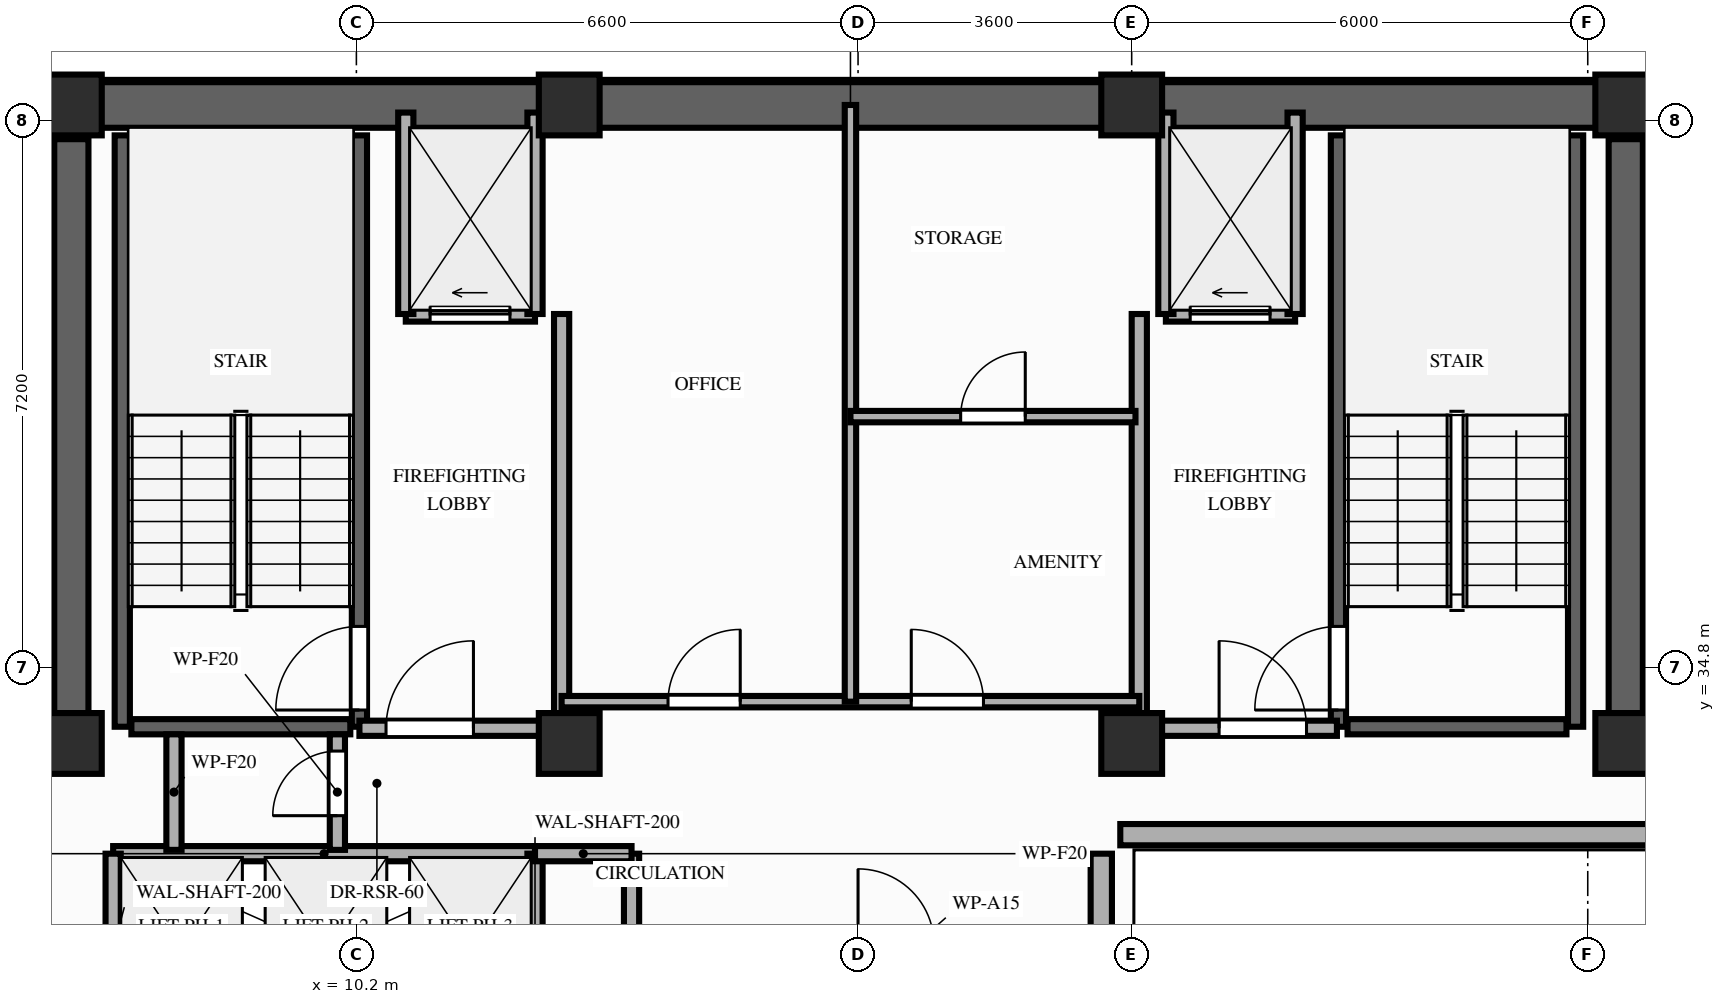
"""IFC4 building model, lengths in metres.
Left out: names, types, materials, properties, quantities, classifications, styles, units other than length and angle.
Written with IfcOpenShell. Run it as: python <this file> out.ifc"""

import sys

from ifc_helpers import new_model, si_unit, direction, frame, frame_2d, origin, origin_2d, place, context, subcontext, project, spatial, rectangle, extrude, element, fill, save


model = new_model("IFC4")
c1 = context("Model", 3, precision=1e-05, world=origin(), true_north=direction((0.0, 1.0)))
c2 = subcontext(c1, "Body", "Model", "MODEL_VIEW")
j1 = project(units=[si_unit("LENGTHUNIT", "METRE"), si_unit("PLANEANGLEUNIT", "RADIAN")], contexts=[c1])
p1 = place(None, origin())
s1 = spatial("IfcSite", under=j1, at=p1, CompositionType="ELEMENT")
p2 = place(p1, origin())
s2 = spatial("IfcBuilding", under=s1, at=p2, CompositionType="ELEMENT")
p3 = place(p2, frame((0.0, 0.0, 247.2)))
s3 = spatial("IfcBuildingStorey", under=s2, at=p3, CompositionType="ELEMENT", Elevation=247.2)
for number, where, z_axis, x_axis in (
    (1, (6.45, 33.8, 0.0), (0.0, 0.0, 1.0), (1.0, 0.0, 0.0)),
    (2, (13.0, 33.8, 0.0), (0.0, 0.0, 1.0), (1.0, 0.0, 0.0)),
    (3, (20.4, 33.8, 0.0), (0.0, 0.0, 1.0), (1.0, 0.0, 0.0)),
    (4, (26.9, 33.8, 0.0), (0.0, 0.0, 1.0), (1.0, 0.0, 0.0)),
    (5, (6.45, 42.2, 0.0), (0.0, 0.0, 1.0), (1.0, 0.0, 0.0)),
    (6, (13.0, 42.2, 0.0), (0.0, 0.0, 1.0), (1.0, 0.0, 0.0)),
    (7, (20.4, 42.2, 0.0), (0.0, 0.0, 1.0), (1.0, 0.0, 0.0)),
    (8, (26.9, 42.2, 0.0), (0.0, 0.0, 1.0), (1.0, 0.0, 0.0)),
):
    element("IfcColumn", number, at=place(p3, frame(where, z_axis=z_axis, x_axis=x_axis)), inside=s3, PredefinedType="COLUMN", context=c2, shape_type="SweptSolid", body=[
        extrude(rectangle(XDim=0.8, YDim=0.8, at=origin_2d()), origin(), (0.0, 0.0, 1.0), 3.2),
    ])
p4 = place(p3, frame((20.0, 10.8, 0.0), z_axis=(0.0, 0.0, 1.0), x_axis=(0.0, 1.0, 0.0)))
e9 = element("IfcWall", 9, at=p4, inside=s3, PredefinedType="STANDARD", context=c2, shape_type="SweptSolid", body=[
    extrude(rectangle(XDim=21.55, YDim=0.28, at=frame_2d((10.775, 0.0))), origin(), (0.0, 0.0, 1.0), 2.5),
])
p5 = place(p4, frame((9.02, 0.0, 0.85)))
e10 = element("IfcOpeningElement", 10, at=p5, cuts=e9, PredefinedType="OPENING", context=c2, shape_type="SweptSolid", body=[
    extrude(rectangle(XDim=2.6, YDim=1.4, at=frame_2d((1.3, 0.7))), frame((0.0, 0.15, 0.0), z_axis=(0.0, -1.0, 0.0), x_axis=(1.0, 0.0, 0.0)), (0.0, 0.0, 1.0), 0.3),
])
p6 = place(p3, frame((20.25, 32.6, 0.0), z_axis=(0.0, 0.0, 1.0), x_axis=(1.0, 0.0, 0.0)))
e11 = element("IfcWall", 11, at=p6, inside=s3, PredefinedType="STANDARD", context=c2, shape_type="SweptSolid", body=[
    extrude(rectangle(XDim=7.35, YDim=0.28, at=frame_2d((3.675, 0.0))), origin(), (0.0, 0.0, 1.0), 2.5),
])
p7 = place(p3, frame((6.45, 42.2, 0.0), z_axis=(0.0, 0.0, 1.0), x_axis=(1.0, 0.0, 0.0)))
e12 = element("IfcWall", 12, at=p7, inside=s3, PredefinedType="SHEAR", context=c2, shape_type="SweptSolid", body=[
    extrude(rectangle(XDim=20.45, YDim=0.6, at=frame_2d((10.225, 0.0))), origin(), (0.0, 0.0, 1.0), 2.96),
])
for number, where, z_axis, x_axis in (
    (13, (6.45, 33.8, 0.0), (0.0, 0.0, 1.0), (0.0, 1.0, 0.0)),
    (14, (26.9, 33.8, 0.0), (0.0, 0.0, 1.0), (0.0, 1.0, 0.0)),
):
    element("IfcWall", number, at=place(p3, frame(where, z_axis=z_axis, x_axis=x_axis)), inside=s3, PredefinedType="SHEAR", context=c2, shape_type="SweptSolid", body=[
        extrude(rectangle(XDim=7.95, YDim=0.45, at=frame_2d((3.975, 0.0))), origin(), (0.0, 0.0, 1.0), 2.96),
    ])
p8 = place(p3, frame((7.12, 34.02, 0.0), z_axis=(0.0, 0.0, 1.0), x_axis=(0.0, 1.0, 0.0)))
e15 = element("IfcWall", 15, at=p8, inside=s3, PredefinedType="SHEAR", context=c2, shape_type="SweptSolid", body=[
    extrude(rectangle(XDim=7.78, YDim=0.2, at=frame_2d((3.89, 0.0))), origin(), (0.0, 0.0, 1.0), 2.96),
])
p9 = place(p3, frame((10.24, 34.02, 0.0), z_axis=(0.0, 0.0, 1.0), x_axis=(0.0, 1.0, 0.0)))
e16 = element("IfcWall", 16, at=p9, inside=s3, PredefinedType="SHEAR", context=c2, shape_type="SweptSolid", body=[
    extrude(rectangle(XDim=7.78, YDim=0.2, at=frame_2d((3.89, 0.0))), origin(), (0.0, 0.0, 1.0), 2.96),
])
p10 = place(p9, frame((0.22, 0.0, 0.0)))
e17 = element("IfcOpeningElement", 17, at=p10, cuts=e16, PredefinedType="OPENING", context=c2, shape_type="SweptSolid", body=[
    extrude(rectangle(XDim=1.1, YDim=2.15, at=frame_2d((0.55, 1.075))), frame((0.0, 0.11, 0.0), z_axis=(0.0, -1.0, 0.0), x_axis=(1.0, 0.0, 0.0)), (0.0, 0.0, 1.0), 0.22),
])
p11 = place(p3, frame((7.24, 34.02, 0.0), z_axis=(0.0, 0.0, 1.0), x_axis=(1.0, 0.0, 0.0)))
e18 = element("IfcWall", 18, at=p11, inside=s3, PredefinedType="SHEAR", context=c2, shape_type="SweptSolid", body=[
    extrude(rectangle(XDim=2.88, YDim=0.2, at=frame_2d((1.44, 0.0))), origin(), (0.0, 0.0, 1.0), 2.96),
])
p12 = place(p3, frame((23.12, 34.02, 0.0), z_axis=(0.0, 0.0, 1.0), x_axis=(0.0, 1.0, 0.0)))
e19 = element("IfcWall", 19, at=p12, inside=s3, PredefinedType="SHEAR", context=c2, shape_type="SweptSolid", body=[
    extrude(rectangle(XDim=7.78, YDim=0.2, at=frame_2d((3.89, 0.0))), origin(), (0.0, 0.0, 1.0), 2.96),
])
p13 = place(p12, frame((0.22, 0.0, 0.0)))
e20 = element("IfcOpeningElement", 20, at=p13, cuts=e19, PredefinedType="OPENING", context=c2, shape_type="SweptSolid", body=[
    extrude(rectangle(XDim=1.1, YDim=2.15, at=frame_2d((0.55, 1.075))), frame((0.0, 0.11, 0.0), z_axis=(0.0, -1.0, 0.0), x_axis=(1.0, 0.0, 0.0)), (0.0, 0.0, 1.0), 0.22),
])
p14 = place(p3, frame((26.24, 34.02, 0.0), z_axis=(0.0, 0.0, 1.0), x_axis=(0.0, 1.0, 0.0)))
e21 = element("IfcWall", 21, at=p14, inside=s3, PredefinedType="SHEAR", context=c2, shape_type="SweptSolid", body=[
    extrude(rectangle(XDim=7.78, YDim=0.2, at=frame_2d((3.89, 0.0))), origin(), (0.0, 0.0, 1.0), 2.96),
])
p15 = place(p3, frame((23.24, 34.02, 0.0), z_axis=(0.0, 0.0, 1.0), x_axis=(1.0, 0.0, 0.0)))
e22 = element("IfcWall", 22, at=p15, inside=s3, PredefinedType="SHEAR", context=c2, shape_type="SweptSolid", body=[
    extrude(rectangle(XDim=2.88, YDim=0.2, at=frame_2d((1.44, 0.0))), origin(), (0.0, 0.0, 1.0), 2.96),
])
p16 = place(p3, frame((7.0, 32.35, 0.0), z_axis=(0.0, 0.0, 1.0), x_axis=(1.0, 0.0, 0.0)))
e23 = element("IfcWall", 23, at=p16, inside=s3, PredefinedType="MOVABLE", context=c2, shape_type="SweptSolid", body=[
    extrude(rectangle(XDim=5.55, YDim=0.2, at=frame_2d((2.775, 0.0))), origin(), (0.0, 0.0, 1.0), 2.96),
])
for number, where, z_axis, x_axis in (
    (24, (7.0, 29.85, 0.0), (0.0, 0.0, 1.0), (0.0, 1.0, 0.0)),
    (25, (12.55, 29.85, 0.0), (0.0, 0.0, 1.0), (0.0, 1.0, 0.0)),
):
    element("IfcWall", number, at=place(p3, frame(where, z_axis=z_axis, x_axis=x_axis)), inside=s3, PredefinedType="MOVABLE", context=c2, shape_type="SweptSolid", body=[
        extrude(rectangle(XDim=2.5, YDim=0.2, at=frame_2d((1.25, 0.0))), origin(), (0.0, 0.0, 1.0), 2.96),
    ])
p17 = place(p3, frame((10.85, 39.45, 0.0), z_axis=(0.0, 0.0, 1.0), x_axis=(1.0, 0.0, 0.0)))
e26 = element("IfcWall", 26, at=p17, inside=s3, PredefinedType="MOVABLE", context=c2, shape_type="SweptSolid", body=[
    extrude(rectangle(XDim=1.7, YDim=0.2, at=frame_2d((0.85, 0.0))), origin(), (0.0, 0.0, 1.0), 2.96),
])
p18 = place(p17, frame((0.32, 0.0, 0.0)))
e27 = element("IfcOpeningElement", 27, at=p18, cuts=e26, PredefinedType="OPENING", context=c2, shape_type="SweptSolid", body=[
    extrude(rectangle(XDim=1.05, YDim=2.15, at=frame_2d((0.525, 1.075))), frame((0.0, 0.11, 0.0), z_axis=(0.0, -1.0, 0.0), x_axis=(1.0, 0.0, 0.0)), (0.0, 0.0, 1.0), 0.22),
])
p19 = place(p3, frame((20.85, 39.45, 0.0), z_axis=(0.0, 0.0, 1.0), x_axis=(1.0, 0.0, 0.0)))
e28 = element("IfcWall", 28, at=p19, inside=s3, PredefinedType="MOVABLE", context=c2, shape_type="SweptSolid", body=[
    extrude(rectangle(XDim=1.7, YDim=0.2, at=frame_2d((0.85, 0.0))), origin(), (0.0, 0.0, 1.0), 2.96),
])
p20 = place(p19, frame((0.32, 0.0, 0.0)))
e29 = element("IfcOpeningElement", 29, at=p20, cuts=e28, PredefinedType="OPENING", context=c2, shape_type="SweptSolid", body=[
    extrude(rectangle(XDim=1.05, YDim=2.15, at=frame_2d((0.525, 1.075))), frame((0.0, 0.11, 0.0), z_axis=(0.0, -1.0, 0.0), x_axis=(1.0, 0.0, 0.0)), (0.0, 0.0, 1.0), 0.22),
])
for number, where, z_axis, x_axis in (
    (30, (10.85, 39.45, 0.0), (0.0, 0.0, 1.0), (0.0, 1.0, 0.0)),
    (31, (12.55, 39.45, 0.0), (0.0, 0.0, 1.0), (0.0, 1.0, 0.0)),
):
    element("IfcWall", number, at=place(p3, frame(where, z_axis=z_axis, x_axis=x_axis)), inside=s3, PredefinedType="MOVABLE", context=c2, shape_type="SweptSolid", body=[
        extrude(rectangle(XDim=2.65, YDim=0.2, at=frame_2d((1.325, 0.0))), origin(), (0.0, 0.0, 1.0), 2.5),
    ])
p21 = place(p3, frame((12.9, 34.0, 0.0), z_axis=(0.0, 0.0, 1.0), x_axis=(0.0, 1.0, 0.0)))
e32 = element("IfcWall", 32, at=p21, inside=s3, PredefinedType="PARTITIONING", context=c2, shape_type="SweptSolid", body=[
    extrude(rectangle(XDim=5.45, YDim=0.2, at=frame_2d((2.725, 0.0))), origin(), (0.0, 0.0, 1.0), 2.5),
])
p22 = place(p3, frame((10.24, 34.0, 0.0), z_axis=(0.0, 0.0, 1.0), x_axis=(1.0, 0.0, 0.0)))
e33 = element("IfcWall", 33, at=p22, inside=s3, PredefinedType="PARTITIONING", context=c2, shape_type="SweptSolid", body=[
    extrude(rectangle(XDim=2.66, YDim=0.2, at=frame_2d((1.33, 0.0))), origin(), (0.0, 0.0, 1.0), 2.5),
])
p23 = place(p22, frame((0.35, 0.0, 0.0)))
e34 = element("IfcOpeningElement", 34, at=p23, cuts=e33, PredefinedType="OPENING", context=c2, shape_type="SweptSolid", body=[
    extrude(rectangle(XDim=1.15, YDim=2.15, at=frame_2d((0.575, 1.075))), frame((0.0, 0.11, 0.0), z_axis=(0.0, -1.0, 0.0), x_axis=(1.0, 0.0, 0.0)), (0.0, 0.0, 1.0), 0.22),
])
for number, where, z_axis, x_axis in (
    (35, (20.85, 39.45, 0.0), (0.0, 0.0, 1.0), (0.0, 1.0, 0.0)),
    (36, (22.55, 39.45, 0.0), (0.0, 0.0, 1.0), (0.0, 1.0, 0.0)),
):
    element("IfcWall", number, at=place(p3, frame(where, z_axis=z_axis, x_axis=x_axis)), inside=s3, PredefinedType="MOVABLE", context=c2, shape_type="SweptSolid", body=[
        extrude(rectangle(XDim=2.65, YDim=0.2, at=frame_2d((1.325, 0.0))), origin(), (0.0, 0.0, 1.0), 2.5),
    ])
p24 = place(p3, frame((20.5, 34.0, 0.0), z_axis=(0.0, 0.0, 1.0), x_axis=(0.0, 1.0, 0.0)))
e37 = element("IfcWall", 37, at=p24, inside=s3, PredefinedType="PARTITIONING", context=c2, shape_type="SweptSolid", body=[
    extrude(rectangle(XDim=5.45, YDim=0.2, at=frame_2d((2.725, 0.0))), origin(), (0.0, 0.0, 1.0), 2.5),
])
p25 = place(p3, frame((20.5, 34.0, 0.0), z_axis=(0.0, 0.0, 1.0), x_axis=(1.0, 0.0, 0.0)))
e38 = element("IfcWall", 38, at=p25, inside=s3, PredefinedType="PARTITIONING", context=c2, shape_type="SweptSolid", body=[
    extrude(rectangle(XDim=2.6, YDim=0.2, at=frame_2d((1.3, 0.0))), origin(), (0.0, 0.0, 1.0), 2.5),
])
p26 = place(p25, frame((1.05, 0.0, 0.0)))
e39 = element("IfcOpeningElement", 39, at=p26, cuts=e38, PredefinedType="OPENING", context=c2, shape_type="SweptSolid", body=[
    extrude(rectangle(XDim=1.15, YDim=2.15, at=frame_2d((0.575, 1.075))), frame((0.0, 0.11, 0.0), z_axis=(0.0, -1.0, 0.0), x_axis=(1.0, 0.0, 0.0)), (0.0, 0.0, 1.0), 0.22),
])
p27 = place(p3, frame((13.82, 29.85, 0.0), z_axis=(0.0, 0.0, 1.0), x_axis=(0.0, 1.0, 0.0)))
e40 = element("IfcWall", 40, at=p27, inside=s3, PredefinedType="PARTITIONING", context=c2, shape_type="SweptSolid", body=[
    extrude(rectangle(XDim=2.5, YDim=0.2, at=frame_2d((1.25, 0.0))), origin(), (0.0, 0.0, 1.0), 2.96),
])
p28 = place(p3, frame((12.55, 32.35, 0.0), z_axis=(0.0, 0.0, 1.0), x_axis=(1.0, 0.0, 0.0)))
e41 = element("IfcWall", 41, at=p28, inside=s3, PredefinedType="PARTITIONING", context=c2, shape_type="SweptSolid", body=[
    extrude(rectangle(XDim=1.27, YDim=0.2, at=frame_2d((0.635, 0.0))), origin(), (0.0, 0.0, 1.0), 2.96),
])
p29 = place(p3, frame((7.8, 32.4, 0.0), z_axis=(0.0, 0.0, 1.0), x_axis=(0.0, 1.0, 0.0)))
e42 = element("IfcWall", 42, at=p29, inside=s3, PredefinedType="PARTITIONING", context=c2, shape_type="SweptSolid", body=[
    extrude(rectangle(XDim=1.52, YDim=0.2, at=frame_2d((0.76, 0.0))), origin(), (0.0, 0.0, 1.0), 2.5),
])
p30 = place(p3, frame((9.95, 32.4, 0.0), z_axis=(0.0, 0.0, 1.0), x_axis=(0.0, 1.0, 0.0)))
e43 = element("IfcWall", 43, at=p30, inside=s3, PredefinedType="PARTITIONING", context=c2, shape_type="SweptSolid", body=[
    extrude(rectangle(XDim=1.52, YDim=0.2, at=frame_2d((0.76, 0.0))), origin(), (0.0, 0.0, 1.0), 2.5),
])
p31 = place(p30, frame((0.45, 0.0, 0.0)))
e44 = element("IfcOpeningElement", 44, at=p31, cuts=e43, PredefinedType="OPENING", context=c2, shape_type="SweptSolid", body=[
    extrude(rectangle(XDim=0.85, YDim=2.05, at=frame_2d((0.425, 1.025))), frame((0.0, 0.11, 0.0), z_axis=(0.0, -1.0, 0.0), x_axis=(1.0, 0.0, 0.0)), (0.0, 0.0, 1.0), 0.22),
])
p32 = place(p3, frame((12.9, 34.35, 0.0), z_axis=(0.0, 0.0, 1.0), x_axis=(1.0, 0.0, 0.0)))
e45 = element("IfcWall", 45, at=p32, inside=s3, PredefinedType="PARTITIONING", context=c2, shape_type="SweptSolid", body=[
    extrude(rectangle(XDim=7.6, YDim=0.15, at=frame_2d((3.8, 0.0))), origin(), (0.0, 0.0, 1.0), 2.96),
])
p33 = place(p32, frame((1.4, 0.0, 0.0)))
e46 = element("IfcOpeningElement", 46, at=p33, cuts=e45, PredefinedType="OPENING", context=c2, shape_type="SweptSolid", body=[
    extrude(rectangle(XDim=0.95, YDim=2.15, at=frame_2d((0.475, 1.075))), frame((0.0, 0.085, 0.0), z_axis=(0.0, -1.0, 0.0), x_axis=(1.0, 0.0, 0.0)), (0.0, 0.0, 1.0), 0.17),
])
p34 = place(p32, frame((4.6, 0.0, 0.0)))
e47 = element("IfcOpeningElement", 47, at=p34, cuts=e45, PredefinedType="OPENING", context=c2, shape_type="SweptSolid", body=[
    extrude(rectangle(XDim=0.95, YDim=2.15, at=frame_2d((0.475, 1.075))), frame((0.0, 0.085, 0.0), z_axis=(0.0, -1.0, 0.0), x_axis=(1.0, 0.0, 0.0)), (0.0, 0.0, 1.0), 0.17),
])
p35 = place(p3, frame((16.7, 34.35, 0.0), z_axis=(0.0, 0.0, 1.0), x_axis=(0.0, 1.0, 0.0)))
e48 = element("IfcWall", 48, at=p35, inside=s3, PredefinedType="PARTITIONING", context=c2, shape_type="SweptSolid", body=[
    extrude(rectangle(XDim=7.85, YDim=0.15, at=frame_2d((3.925, 0.0))), origin(), (0.0, 0.0, 1.0), 2.5),
])
p36 = place(p3, frame((16.7, 38.1, 0.0), z_axis=(0.0, 0.0, 1.0), x_axis=(1.0, 0.0, 0.0)))
e49 = element("IfcWall", 49, at=p36, inside=s3, PredefinedType="PARTITIONING", context=c2, shape_type="SweptSolid", body=[
    extrude(rectangle(XDim=3.75, YDim=0.15, at=frame_2d((1.875, 0.0))), origin(), (0.0, 0.0, 1.0), 2.96),
])
p37 = place(p36, frame((1.45, 0.0, 0.0)))
e50 = element("IfcOpeningElement", 50, at=p37, cuts=e49, PredefinedType="OPENING", context=c2, shape_type="SweptSolid", body=[
    extrude(rectangle(XDim=0.85, YDim=2.05, at=frame_2d((0.425, 1.025))), frame((0.0, 0.085, 0.0), z_axis=(0.0, -1.0, 0.0), x_axis=(1.0, 0.0, 0.0)), (0.0, 0.0, 1.0), 0.17),
])
p38 = place(p10, origin())
e51 = element("IfcDoor", 51, at=p38, inside=s3, OperationType="SINGLE_SWING_LEFT", PredefinedType="DOOR", context=c2, shape_type="SweptSolid", body=[
    extrude(rectangle(XDim=1.1, YDim=2.15, at=frame_2d((0.55, 1.075))), frame((0.0, 0.025, 0.0), z_axis=(0.0, -1.0, 0.0), x_axis=(1.0, 0.0, 0.0)), (0.0, 0.0, 1.0), 0.05),
])
fill(e17, e51)
p39 = place(p13, origin())
e52 = element("IfcDoor", 52, at=p39, inside=s3, OperationType="SINGLE_SWING_LEFT", PredefinedType="DOOR", context=c2, shape_type="SweptSolid", body=[
    extrude(rectangle(XDim=1.1, YDim=2.15, at=frame_2d((0.55, 1.075))), frame((0.0, 0.025, 0.0), z_axis=(0.0, -1.0, 0.0), x_axis=(1.0, 0.0, 0.0)), (0.0, 0.0, 1.0), 0.05),
])
fill(e20, e52)
p40 = place(p18, origin())
e53 = element("IfcDoor", 53, at=p40, inside=s3, OperationType="SLIDING_TO_LEFT", PredefinedType="DOOR", context=c2, shape_type="SweptSolid", body=[
    extrude(rectangle(XDim=1.05, YDim=2.15, at=frame_2d((0.525, 1.075))), frame((0.0, 0.025, 0.0), z_axis=(0.0, -1.0, 0.0), x_axis=(1.0, 0.0, 0.0)), (0.0, 0.0, 1.0), 0.05),
])
fill(e27, e53)
p41 = place(p20, origin())
e54 = element("IfcDoor", 54, at=p41, inside=s3, OperationType="SLIDING_TO_LEFT", PredefinedType="DOOR", context=c2, shape_type="SweptSolid", body=[
    extrude(rectangle(XDim=1.05, YDim=2.15, at=frame_2d((0.525, 1.075))), frame((0.0, 0.025, 0.0), z_axis=(0.0, -1.0, 0.0), x_axis=(1.0, 0.0, 0.0)), (0.0, 0.0, 1.0), 0.05),
])
fill(e29, e54)
p42 = place(p23, origin())
e55 = element("IfcDoor", 55, at=p42, inside=s3, OperationType="SINGLE_SWING_RIGHT", PredefinedType="DOOR", context=c2, shape_type="SweptSolid", body=[
    extrude(rectangle(XDim=1.15, YDim=2.15, at=frame_2d((0.575, 1.075))), frame((0.0, 0.025, 0.0), z_axis=(0.0, -1.0, 0.0), x_axis=(1.0, 0.0, 0.0)), (0.0, 0.0, 1.0), 0.05),
])
fill(e34, e55)
p43 = place(p26, origin())
e56 = element("IfcDoor", 56, at=p43, inside=s3, OperationType="SINGLE_SWING_LEFT", PredefinedType="DOOR", context=c2, shape_type="SweptSolid", body=[
    extrude(rectangle(XDim=1.15, YDim=2.15, at=frame_2d((0.575, 1.075))), frame((0.0, 0.025, 0.0), z_axis=(0.0, -1.0, 0.0), x_axis=(1.0, 0.0, 0.0)), (0.0, 0.0, 1.0), 0.05),
])
fill(e39, e56)
p44 = place(p31, origin())
e57 = element("IfcDoor", 57, at=p44, inside=s3, OperationType="SINGLE_SWING_LEFT", PredefinedType="DOOR", context=c2, shape_type="SweptSolid", body=[
    extrude(rectangle(XDim=0.85, YDim=2.05, at=frame_2d((0.425, 1.025))), frame((0.0, 0.025, 0.0), z_axis=(0.0, -1.0, 0.0), x_axis=(1.0, 0.0, 0.0)), (0.0, 0.0, 1.0), 0.05),
])
fill(e44, e57)
p45 = place(p33, origin())
e58 = element("IfcDoor", 58, at=p45, inside=s3, OperationType="SINGLE_SWING_RIGHT", PredefinedType="DOOR", context=c2, shape_type="SweptSolid", body=[
    extrude(rectangle(XDim=0.95, YDim=2.15, at=frame_2d((0.475, 1.075))), frame((0.0, 0.025, 0.0), z_axis=(0.0, -1.0, 0.0), x_axis=(1.0, 0.0, 0.0)), (0.0, 0.0, 1.0), 0.05),
])
fill(e46, e58)
p46 = place(p34, origin())
e59 = element("IfcDoor", 59, at=p46, inside=s3, OperationType="SINGLE_SWING_LEFT", PredefinedType="DOOR", context=c2, shape_type="SweptSolid", body=[
    extrude(rectangle(XDim=0.95, YDim=2.15, at=frame_2d((0.475, 1.075))), frame((0.0, 0.025, 0.0), z_axis=(0.0, -1.0, 0.0), x_axis=(1.0, 0.0, 0.0)), (0.0, 0.0, 1.0), 0.05),
])
fill(e47, e59)
p47 = place(p37, origin())
e60 = element("IfcDoor", 60, at=p47, inside=s3, OperationType="SINGLE_SWING_RIGHT", PredefinedType="DOOR", context=c2, shape_type="SweptSolid", body=[
    extrude(rectangle(XDim=0.85, YDim=2.05, at=frame_2d((0.425, 1.025))), frame((0.0, 0.025, 0.0), z_axis=(0.0, -1.0, 0.0), x_axis=(1.0, 0.0, 0.0)), (0.0, 0.0, 1.0), 0.05),
])
fill(e50, e60)
save(model, sys.argv[1])
